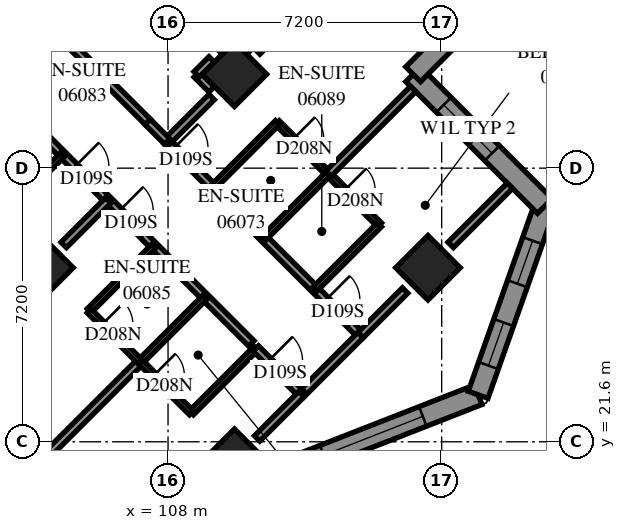
"""IFC4 building model, lengths in metres.
Left out: names, types, materials, properties, quantities, classifications, styles, units other than length and angle.
Written with IfcOpenShell. Run it as: python <this file> out.ifc"""

import sys

from ifc_helpers import new_model, si_unit, direction, frame, frame_2d, origin, origin_2d, place, context, subcontext, project, spatial, polyline, rectangle, outline, extrude, element, fill, save


model = new_model("IFC4")
c1 = context("Model", 3, precision=1e-05, world=origin(), true_north=direction((0.0, 1.0)))
c2 = subcontext(c1, "Body", "Model", "MODEL_VIEW")
j1 = project(units=[si_unit("LENGTHUNIT", "METRE"), si_unit("PLANEANGLEUNIT", "RADIAN")], contexts=[c1])
p1 = place(None, origin())
s1 = spatial("IfcSite", under=j1, at=p1, CompositionType="ELEMENT")
p2 = place(p1, origin())
s2 = spatial("IfcBuilding", under=s1, at=p2, CompositionType="ELEMENT")
p3 = place(p2, frame((0.0, 0.0, 27.0)))
s3 = spatial("IfcBuildingStorey", under=s2, at=p3, CompositionType="ELEMENT", Elevation=27.0)
for number, where, z_axis, x_axis in (
    (1, (109.747, 31.271, 0.0), (0.0, 0.0, 1.0), (0.707, -0.707, 0.0)),
    (2, (104.656, 26.18, 0.0), (0.0, 0.0, 1.0), (0.707, -0.707, 0.0)),
    (3, (114.838, 26.18, 0.0), (0.0, 0.0, 1.0), (0.707, -0.707, 0.0)),
    (4, (109.747, 21.088, 0.0), (0.0, 0.0, 1.0), (0.707, -0.707, 0.0)),
):
    element("IfcColumn", number, at=place(p3, frame(where, z_axis=z_axis, x_axis=x_axis)), inside=s3, PredefinedType="COLUMN", context=c2, shape_type="SweptSolid", body=[
        extrude(rectangle(XDim=1.2, YDim=1.2, at=origin_2d()), origin(), (0.0, 0.0, 1.0), 3.1),
    ])
p4 = place(p3, frame((111.055, 20.841, 0.0), z_axis=(0.0, 0.0, 1.0), x_axis=(0.9313442446, 0.3641399428, 0.0)))
e5 = element("IfcWall", 5, at=p4, inside=s3, PredefinedType="SOLIDWALL", context=c2, shape_type="SweptSolid", body=[
    extrude(outline(polyline([(0.12, -0.275), (5.606, -0.275), (5.354, 0.275), (-0.12, 0.275), (0.12, -0.275)])), origin(), (0.0, 0.0, 1.0), 3.1),
])
p5 = place(p4, frame((1.118, 0.0, 0.5)))
e6 = element("IfcOpeningElement", 6, at=p5, cuts=e5, PredefinedType="OPENING", context=c2, shape_type="SweptSolid", body=[
    extrude(rectangle(XDim=2.8, YDim=2.45, at=frame_2d((1.4, 1.225))), frame((0.0, 0.285, 0.0), z_axis=(0.0, -1.0, 0.0), x_axis=(1.0, 0.0, 0.0)), (0.0, 0.0, 1.0), 0.57),
])
p6 = place(p3, frame((116.159, 22.837, 0.0), z_axis=(0.0, 0.0, 1.0), x_axis=(0.3333124239, 0.9428164339, 0.0)))
e7 = element("IfcWall", 7, at=p6, inside=s3, PredefinedType="SOLIDWALL", context=c2, shape_type="SweptSolid", body=[
    extrude(outline(polyline([(-0.126, -0.275), (5.443, -0.275), (5.096, 0.275), (0.126, 0.275), (-0.126, -0.275)])), origin(), (0.0, 0.0, 1.0), 3.1),
])
p7 = place(p6, frame((0.816, 0.0, 0.5)))
e8 = element("IfcOpeningElement", 8, at=p7, cuts=e7, PredefinedType="OPENING", context=c2, shape_type="SweptSolid", body=[
    extrude(rectangle(XDim=1.2, YDim=2.45, at=frame_2d((0.6, 1.225))), frame((0.0, 0.285, 0.0), z_axis=(0.0, -1.0, 0.0), x_axis=(1.0, 0.0, 0.0)), (0.0, 0.0, 1.0), 0.57),
])
p8 = place(p6, frame((3.101, 0.0, 0.5)))
e9 = element("IfcOpeningElement", 9, at=p8, cuts=e7, PredefinedType="OPENING", context=c2, shape_type="SweptSolid", body=[
    extrude(rectangle(XDim=1.2, YDim=2.45, at=frame_2d((0.6, 1.225))), frame((0.0, 0.285, 0.0), z_axis=(0.0, -1.0, 0.0), x_axis=(1.0, 0.0, 0.0)), (0.0, 0.0, 1.0), 0.57),
])
p9 = place(p3, frame((117.915, 27.805, 0.0), z_axis=(0.0, 0.0, 1.0), x_axis=(-0.7071067812, 0.7071067812, 0.0)))
e10 = element("IfcWall", 10, at=p9, inside=s3, PredefinedType="SOLIDWALL", context=c2, shape_type="SweptSolid", body=[
    extrude(outline(polyline([(-0.173, -0.275), (4.627, -0.275), (5.177, 0.275), (0.173, 0.275), (-0.173, -0.275)])), origin(), (0.0, 0.0, 1.0), 3.1),
])
p10 = place(p9, frame((1.964, 0.0, 0.6)))
e11 = element("IfcOpeningElement", 11, at=p10, cuts=e10, PredefinedType="OPENING", context=c2, shape_type="SweptSolid", body=[
    extrude(rectangle(XDim=1.8, YDim=1.9, at=frame_2d((0.9, 0.95))), frame((0.0, 0.285, 0.0), z_axis=(0.0, -1.0, 0.0), x_axis=(1.0, 0.0, 0.0)), (0.0, 0.0, 1.0), 0.57),
])
p11 = place(p3, frame((114.449, 31.271, 0.0), z_axis=(0.0, 0.0, 1.0), x_axis=(0.7070978821, 0.7071156801, 0.0)))
e12 = element("IfcWall", 12, at=p11, inside=s3, PredefinedType="SOLIDWALL", context=c2, shape_type="SweptSolid", body=[
    extrude(outline(polyline([(0.275, -0.275), (5.975, -0.275), (5.262, 0.275), (-0.275, 0.275), (0.275, -0.275)])), origin(), (0.0, 0.0, 1.0), 3.1),
])
p12 = place(p11, frame((1.137, 0.0, 0.6)))
e13 = element("IfcOpeningElement", 13, at=p12, cuts=e12, PredefinedType="OPENING", context=c2, shape_type="SweptSolid", body=[
    extrude(rectangle(XDim=1.8, YDim=1.9, at=frame_2d((0.9, 0.95))), frame((0.0, 0.285, 0.0), z_axis=(0.0, -1.0, 0.0), x_axis=(1.0, 0.0, 0.0)), (0.0, 0.0, 1.0), 0.57),
])
p13 = place(p3, frame((102.609, 31.769, 0.0), z_axis=(0.0, 0.0, 1.0), x_axis=(0.7071067812, -0.7071067812, 0.0)))
e14 = element("IfcWall", 14, at=p13, inside=s3, PredefinedType="PARTITIONING", context=c2, shape_type="SweptSolid", body=[
    extrude(rectangle(XDim=10.723, YDim=0.2, at=frame_2d((5.361, 0.0))), origin(), (0.0, 0.0, 1.0), 3.1),
])
p14 = place(p13, frame((4.15, 0.0, 0.0)))
e15 = element("IfcOpeningElement", 15, at=p14, cuts=e14, PredefinedType="OPENING", context=c2, shape_type="SweptSolid", body=[
    extrude(rectangle(XDim=0.9, YDim=2.1, at=frame_2d((0.45, 1.05))), frame((0.0, 0.11, 0.0), z_axis=(0.0, -1.0, 0.0), x_axis=(1.0, 0.0, 0.0)), (0.0, 0.0, 1.0), 0.22),
])
p15 = place(p13, frame((5.8, 0.0, 0.0)))
e16 = element("IfcOpeningElement", 16, at=p15, cuts=e14, PredefinedType="OPENING", context=c2, shape_type="SweptSolid", body=[
    extrude(rectangle(XDim=0.9, YDim=2.1, at=frame_2d((0.45, 1.05))), frame((0.0, 0.11, 0.0), z_axis=(0.0, -1.0, 0.0), x_axis=(1.0, 0.0, 0.0)), (0.0, 0.0, 1.0), 0.22),
])
p16 = place(p3, frame((101.597, 18.038, 0.0), z_axis=(0.0, 0.0, 1.0), x_axis=(0.7072439346, 0.7069696012, 0.0)))
e17 = element("IfcWall", 17, at=p16, inside=s3, PredefinedType="PARTITIONING", context=c2, shape_type="SweptSolid", body=[
    extrude(rectangle(XDim=8.019, YDim=0.2, at=frame_2d((4.01, 0.0))), origin(), (0.0, 0.0, 1.0), 3.1),
])
p17 = place(p3, frame((107.977, 29.499, 0.0), z_axis=(0.0, 0.0, 1.0), x_axis=(0.7071067812, -0.7071067812, 0.0)))
e18 = element("IfcWall", 18, at=p17, inside=s3, PredefinedType="PARTITIONING", context=c2, shape_type="SweptSolid", body=[
    extrude(rectangle(XDim=7.198, YDim=0.2, at=frame_2d((3.599, 0.0))), origin(), (0.0, 0.0, 1.0), 3.1),
])
p18 = place(p17, frame((0.247, 0.0, 0.0)))
e19 = element("IfcOpeningElement", 19, at=p18, cuts=e18, PredefinedType="OPENING", context=c2, shape_type="SweptSolid", body=[
    extrude(rectangle(XDim=0.9, YDim=2.1, at=frame_2d((0.45, 1.05))), frame((0.0, 0.11, 0.0), z_axis=(0.0, -1.0, 0.0), x_axis=(1.0, 0.0, 0.0)), (0.0, 0.0, 1.0), 0.22),
])
p19 = place(p17, frame((5.899, 0.0, 0.0)))
e20 = element("IfcOpeningElement", 20, at=p19, cuts=e18, PredefinedType="OPENING", context=c2, shape_type="SweptSolid", body=[
    extrude(rectangle(XDim=0.9, YDim=2.1, at=frame_2d((0.45, 1.05))), frame((0.0, 0.11, 0.0), z_axis=(0.0, -1.0, 0.0), x_axis=(1.0, 0.0, 0.0)), (0.0, 0.0, 1.0), 0.22),
])
p20 = place(p3, frame((110.345, 31.871, 0.0), z_axis=(0.0, 0.0, 1.0), x_axis=(0.7071067812, 0.7071067812, 0.0)))
e21 = element("IfcWall", 21, at=p20, inside=s3, PredefinedType="PARTITIONING", context=c2, shape_type="SweptSolid", body=[
    extrude(rectangle(XDim=5.504, YDim=0.2, at=frame_2d((2.752, 0.0))), origin(), (0.0, 0.0, 1.0), 3.1),
])
p21 = place(p3, frame((110.875, 29.995, 0.0), z_axis=(0.0, 0.0, 1.0), x_axis=(0.7071067812, -0.7071067812, 0.0)))
e22 = element("IfcWall", 22, at=p21, inside=s3, PredefinedType="PARTITIONING", context=c2, shape_type="SweptSolid", body=[
    extrude(rectangle(XDim=3.801, YDim=0.15, at=frame_2d((1.901, 0.0))), origin(), (0.0, 0.0, 1.0), 3.1),
])
p22 = place(p21, frame((0.598, 0.0, 0.0)))
e23 = element("IfcOpeningElement", 23, at=p22, cuts=e22, PredefinedType="OPENING", context=c2, shape_type="SweptSolid", body=[
    extrude(rectangle(XDim=0.8, YDim=2.1, at=frame_2d((0.4, 1.05))), frame((0.0, 0.085, 0.0), z_axis=(0.0, -1.0, 0.0), x_axis=(1.0, 0.0, 0.0)), (0.0, 0.0, 1.0), 0.17),
])
p23 = place(p21, frame((2.507, 0.0, 0.0)))
e24 = element("IfcOpeningElement", 24, at=p23, cuts=e22, PredefinedType="OPENING", context=c2, shape_type="SweptSolid", body=[
    extrude(rectangle(XDim=0.8, YDim=2.1, at=frame_2d((0.4, 1.05))), frame((0.0, 0.085, 0.0), z_axis=(0.0, -1.0, 0.0), x_axis=(1.0, 0.0, 0.0)), (0.0, 0.0, 1.0), 0.17),
])
p24 = place(p3, frame((112.221, 28.655, 0.0), z_axis=(0.0, 0.0, 1.0), x_axis=(0.7071067812, 0.7071067812, 0.0)))
e25 = element("IfcWall", 25, at=p24, inside=s3, PredefinedType="PARTITIONING", context=c2, shape_type="SweptSolid", body=[
    extrude(rectangle(XDim=3.15, YDim=0.2, at=frame_2d((1.575, 0.0))), origin(), (0.0, 0.0, 1.0), 3.1),
])
p25 = place(p3, frame((105.435, 32.049, 0.0), z_axis=(0.0, 0.0, 1.0), x_axis=(0.7074545101, -0.7067588812, 0.0)))
e26 = element("IfcWall", 26, at=p25, inside=s3, PredefinedType="PARTITIONING", context=c2, shape_type="SweptSolid", body=[
    extrude(rectangle(XDim=2.875, YDim=0.2, at=frame_2d((1.438, 0.0))), origin(), (0.0, 0.0, 1.0), 3.1),
])
for number, where, z_axis, x_axis in (
    (27, (103.523, 27.453, 0.0), (0.0, 0.0, 1.0), (0.707, 0.707, 0.0)),
    (28, (105.927, 25.049, 0.0), (0.0, 0.0, 1.0), (0.707, 0.707, 0.0)),
    (29, (107.271, 23.705, 0.0), (0.0, 0.0, 1.0), (0.707, 0.707, 0.0)),
):
    element("IfcWall", number, at=place(p3, frame(where, z_axis=z_axis, x_axis=x_axis)), inside=s3, PredefinedType="PARTITIONING", context=c2, shape_type="SweptSolid", body=[
        extrude(rectangle(XDim=2.401, YDim=0.15, at=frame_2d((1.201, 0.0))), origin(), (0.0, 0.0, 1.0), 3.1),
    ])
for number, where, z_axis, x_axis in (
    (30, (109.182, 28.3, 0.0), (0.0, 0.0, 1.0), (0.707, 0.708, 0.0)),
    (31, (111.865, 25.616, 0.0), (0.0, 0.0, 1.0), (0.708, 0.707, 0.0)),
    (32, (110.522, 26.96, 0.0), (0.0, 0.0, 1.0), (0.708, 0.707, 0.0)),
):
    element("IfcWall", number, at=place(p3, frame(where, z_axis=z_axis, x_axis=x_axis)), inside=s3, PredefinedType="PARTITIONING", context=c2, shape_type="SweptSolid", body=[
        extrude(rectangle(XDim=2.4, YDim=0.15, at=frame_2d((1.2, 0.0))), origin(), (0.0, 0.0, 1.0), 3.1),
    ])
p26 = place(p3, frame((108.615, 22.363, 0.0), z_axis=(0.0, 0.0, 1.0), x_axis=(0.7071067812, 0.7071067812, 0.0)))
e33 = element("IfcWall", 33, at=p26, inside=s3, PredefinedType="PARTITIONING", context=c2, shape_type="SweptSolid", body=[
    extrude(rectangle(XDim=2.398, YDim=0.15, at=frame_2d((1.199, 0.0))), origin(), (0.0, 0.0, 1.0), 3.1),
])
p27 = place(p3, frame((111.513, 22.857, 0.0), z_axis=(0.0, 0.0, 1.0), x_axis=(0.7071067812, 0.7071067812, 0.0)))
e34 = element("IfcWall", 34, at=p27, inside=s3, PredefinedType="PARTITIONING", context=c2, shape_type="SweptSolid", body=[
    extrude(rectangle(XDim=2.2, YDim=0.2, at=frame_2d((1.1, 0.0))), origin(), (0.0, 0.0, 1.0), 2.6),
])
p28 = place(p3, frame((115.438, 26.78, 0.0), z_axis=(0.0, 0.0, 1.0), x_axis=(0.7071067812, 0.7071067812, 0.0)))
e35 = element("IfcWall", 35, at=p28, inside=s3, PredefinedType="PARTITIONING", context=c2, shape_type="SweptSolid", body=[
    extrude(rectangle(XDim=2.201, YDim=0.2, at=frame_2d((1.101, 0.0))), origin(), (0.0, 0.0, 1.0), 3.1),
])
p29 = place(p3, frame((105.925, 25.045, 0.0), z_axis=(0.0, 0.0, 1.0), x_axis=(0.7071067812, -0.7071067812, 0.0)))
e36 = element("IfcWall", 36, at=p29, inside=s3, PredefinedType="PARTITIONING", context=c2, shape_type="SweptSolid", body=[
    extrude(rectangle(XDim=1.901, YDim=0.15, at=frame_2d((0.95, 0.0))), origin(), (0.0, 0.0, 1.0), 3.1),
])
p30 = place(p29, frame((0.493, 0.0, 0.0)))
e37 = element("IfcOpeningElement", 37, at=p30, cuts=e36, PredefinedType="OPENING", context=c2, shape_type="SweptSolid", body=[
    extrude(rectangle(XDim=0.8, YDim=2.1, at=frame_2d((0.4, 1.05))), frame((0.0, 0.085, 0.0), z_axis=(0.0, -1.0, 0.0), x_axis=(1.0, 0.0, 0.0)), (0.0, 0.0, 1.0), 0.17),
])
p31 = place(p3, frame((107.272, 23.704, 0.0), z_axis=(0.0, 0.0, 1.0), x_axis=(0.7076330979, -0.7065800724, 0.0)))
e38 = element("IfcWall", 38, at=p31, inside=s3, PredefinedType="PARTITIONING", context=c2, shape_type="SweptSolid", body=[
    extrude(rectangle(XDim=1.899, YDim=0.15, at=frame_2d((0.95, 0.0))), origin(), (0.0, 0.0, 1.0), 3.1),
])
p32 = place(p31, frame((0.503, 0.0, 0.0)))
e39 = element("IfcOpeningElement", 39, at=p32, cuts=e38, PredefinedType="OPENING", context=c2, shape_type="SweptSolid", body=[
    extrude(rectangle(XDim=0.8, YDim=2.1, at=frame_2d((0.4, 1.05))), frame((0.0, 0.085, 0.0), z_axis=(0.0, -1.0, 0.0), x_axis=(1.0, 0.0, 0.0)), (0.0, 0.0, 1.0), 0.17),
])
p33 = place(p3, frame((110.309, 24.055, 0.0), z_axis=(0.0, 0.0, 1.0), x_axis=(0.7071067812, -0.7071067812, 0.0)))
e40 = element("IfcWall", 40, at=p33, inside=s3, PredefinedType="PARTITIONING", context=c2, shape_type="SweptSolid", body=[
    extrude(rectangle(XDim=1.7, YDim=0.2, at=frame_2d((0.85, 0.0))), origin(), (0.0, 0.0, 1.0), 3.1),
])
p34 = place(p33, frame((0.467, 0.0, 0.0)))
e41 = element("IfcOpeningElement", 41, at=p34, cuts=e40, PredefinedType="OPENING", context=c2, shape_type="SweptSolid", body=[
    extrude(rectangle(XDim=0.9, YDim=2.1, at=frame_2d((0.45, 1.05))), frame((0.0, 0.11, 0.0), z_axis=(0.0, -1.0, 0.0), x_axis=(1.0, 0.0, 0.0)), (0.0, 0.0, 1.0), 0.22),
])
p35 = place(p3, frame((105.255, 26.781, 0.0), z_axis=(0.0, 0.0, 1.0), x_axis=(0.7071067812, 0.7071067812, 0.0)))
e42 = element("IfcWall", 42, at=p35, inside=s3, PredefinedType="PARTITIONING", context=c2, shape_type="SweptSolid", body=[
    extrude(rectangle(XDim=1.652, YDim=0.2, at=frame_2d((0.826, 0.0))), origin(), (0.0, 0.0, 1.0), 3.1),
])
for number, where, z_axis, x_axis in (
    (43, (110.346, 21.689, 0.0), (0.0, 0.0, 1.0), (0.707, 0.707, 0.0)),
    (44, (113.07, 24.413, 0.0), (0.0, 0.0, 1.0), (0.707, 0.707, 0.0)),
):
    element("IfcWall", number, at=place(p3, frame(where, z_axis=z_axis, x_axis=x_axis)), inside=s3, PredefinedType="PARTITIONING", context=c2, shape_type="SweptSolid", body=[
        extrude(rectangle(XDim=1.652, YDim=0.2, at=frame_2d((0.826, 0.0))), origin(), (0.0, 0.0, 1.0), 2.6),
    ])
p36 = place(p3, frame((107.978, 29.504, 0.0), z_axis=(0.0, 0.0, 1.0), x_axis=(0.7071067812, 0.7071067812, 0.0)))
e45 = element("IfcWall", 45, at=p36, inside=s3, PredefinedType="PARTITIONING", context=c2, shape_type="SweptSolid", body=[
    extrude(rectangle(XDim=1.652, YDim=0.2, at=frame_2d((0.826, 0.0))), origin(), (0.0, 0.0, 1.0), 3.1),
])
p37 = place(p3, frame((107.466, 30.014, 0.0), z_axis=(0.0, 0.0, 1.0), x_axis=(0.7057270646, -0.7084838109, 0.0)))
e46 = element("IfcWall", 46, at=p37, inside=s3, PredefinedType="PARTITIONING", context=c2, shape_type="SweptSolid", body=[
    extrude(rectangle(XDim=0.726, YDim=0.2, at=frame_2d((0.363, 0.0))), origin(), (0.0, 0.0, 1.0), 3.1),
])
for number, where, z_axis, x_axis in (
    (47, (108.754, 31.268, 0.0), (0.0, 0.0, 1.0), (0.707, -0.707, 0.0)),
    (48, (109.751, 32.265, 0.0), (0.0, 0.0, 1.0), (0.707, -0.707, 0.0)),
    (49, (109.355, 31.871, 0.0), (0.0, 0.0, 1.0), (0.707, 0.707, 0.0)),
    (50, (108.753, 31.269, 0.0), (0.0, 0.0, 1.0), (0.707, 0.707, 0.0)),
):
    element("IfcWall", number, at=place(p3, frame(where, z_axis=z_axis, x_axis=x_axis)), inside=s3, PredefinedType="PARTITIONING", context=c2, shape_type="SweptSolid", body=[
        extrude(rectangle(XDim=0.557, YDim=0.2, at=frame_2d((0.279, 0.0))), origin(), (0.0, 0.0, 1.0), 3.1),
    ])
p38 = place(p5, origin())
e51 = element("IfcWindow", 51, at=p38, inside=s3, PartitioningType="SINGLE_PANEL", PredefinedType="WINDOW", context=c2, shape_type="SweptSolid", body=[
    extrude(rectangle(XDim=2.8, YDim=2.45, at=frame_2d((1.4, 1.225))), frame((0.0, 0.155, 0.0), z_axis=(0.0, -1.0, 0.0), x_axis=(1.0, 0.0, 0.0)), (0.0, 0.0, 1.0), 0.06),
])
fill(e6, e51)
p39 = place(p7, origin())
e52 = element("IfcWindow", 52, at=p39, inside=s3, PartitioningType="SINGLE_PANEL", PredefinedType="WINDOW", context=c2, shape_type="SweptSolid", body=[
    extrude(rectangle(XDim=1.2, YDim=2.45, at=frame_2d((0.6, 1.225))), frame((0.0, 0.155, 0.0), z_axis=(0.0, -1.0, 0.0), x_axis=(1.0, 0.0, 0.0)), (0.0, 0.0, 1.0), 0.06),
])
fill(e8, e52)
p40 = place(p8, origin())
e53 = element("IfcWindow", 53, at=p40, inside=s3, PartitioningType="SINGLE_PANEL", PredefinedType="WINDOW", context=c2, shape_type="SweptSolid", body=[
    extrude(rectangle(XDim=1.2, YDim=2.45, at=frame_2d((0.6, 1.225))), frame((0.0, 0.155, 0.0), z_axis=(0.0, -1.0, 0.0), x_axis=(1.0, 0.0, 0.0)), (0.0, 0.0, 1.0), 0.06),
])
fill(e9, e53)
p41 = place(p10, origin())
e54 = element("IfcWindow", 54, at=p41, inside=s3, PartitioningType="SINGLE_PANEL", PredefinedType="WINDOW", context=c2, shape_type="SweptSolid", body=[
    extrude(rectangle(XDim=1.8, YDim=1.9, at=frame_2d((0.9, 0.95))), frame((0.0, 0.155, 0.0), z_axis=(0.0, -1.0, 0.0), x_axis=(1.0, 0.0, 0.0)), (0.0, 0.0, 1.0), 0.06),
])
fill(e11, e54)
p42 = place(p18, origin())
e55 = element("IfcDoor", 55, at=p42, inside=s3, OperationType="SINGLE_SWING_LEFT", PredefinedType="DOOR", context=c2, shape_type="SweptSolid", body=[
    extrude(rectangle(XDim=0.9, YDim=2.1, at=frame_2d((0.45, 1.05))), frame((0.0, 0.025, 0.0), z_axis=(0.0, -1.0, 0.0), x_axis=(1.0, 0.0, 0.0)), (0.0, 0.0, 1.0), 0.05),
])
fill(e19, e55)
p43 = place(p22, origin())
e56 = element("IfcDoor", 56, at=p43, inside=s3, OperationType="SINGLE_SWING_RIGHT", PredefinedType="DOOR", context=c2, shape_type="SweptSolid", body=[
    extrude(rectangle(XDim=0.8, YDim=2.1, at=frame_2d((0.4, 1.05))), frame((0.0, 0.025, 0.0), z_axis=(0.0, -1.0, 0.0), x_axis=(1.0, 0.0, 0.0)), (0.0, 0.0, 1.0), 0.05),
])
fill(e23, e56)
p44 = place(p14, origin())
e57 = element("IfcDoor", 57, at=p44, inside=s3, OperationType="SINGLE_SWING_LEFT", PredefinedType="DOOR", context=c2, shape_type="SweptSolid", body=[
    extrude(rectangle(XDim=0.9, YDim=2.1, at=frame_2d((0.45, 1.05))), frame((0.0, 0.025, 0.0), z_axis=(0.0, -1.0, 0.0), x_axis=(1.0, 0.0, 0.0)), (0.0, 0.0, 1.0), 0.05),
])
fill(e15, e57)
p45 = place(p15, origin())
e58 = element("IfcDoor", 58, at=p45, inside=s3, OperationType="SINGLE_SWING_RIGHT", PredefinedType="DOOR", context=c2, shape_type="SweptSolid", body=[
    extrude(rectangle(XDim=0.9, YDim=2.1, at=frame_2d((0.45, 1.05))), frame((0.0, 0.025, 0.0), z_axis=(0.0, -1.0, 0.0), x_axis=(1.0, 0.0, 0.0)), (0.0, 0.0, 1.0), 0.05),
])
fill(e16, e58)
p46 = place(p30, origin())
e59 = element("IfcDoor", 59, at=p46, inside=s3, OperationType="SINGLE_SWING_RIGHT", PredefinedType="DOOR", context=c2, shape_type="SweptSolid", body=[
    extrude(rectangle(XDim=0.8, YDim=2.1, at=frame_2d((0.4, 1.05))), frame((0.0, 0.025, 0.0), z_axis=(0.0, -1.0, 0.0), x_axis=(1.0, 0.0, 0.0)), (0.0, 0.0, 1.0), 0.05),
])
fill(e37, e59)
p47 = place(p34, origin())
e60 = element("IfcDoor", 60, at=p47, inside=s3, OperationType="SINGLE_SWING_LEFT", PredefinedType="DOOR", context=c2, shape_type="SweptSolid", body=[
    extrude(rectangle(XDim=0.9, YDim=2.1, at=frame_2d((0.45, 1.05))), frame((0.0, 0.025, 0.0), z_axis=(0.0, -1.0, 0.0), x_axis=(1.0, 0.0, 0.0)), (0.0, 0.0, 1.0), 0.05),
])
fill(e41, e60)
p48 = place(p32, origin())
e61 = element("IfcDoor", 61, at=p48, inside=s3, OperationType="SINGLE_SWING_RIGHT", PredefinedType="DOOR", context=c2, shape_type="SweptSolid", body=[
    extrude(rectangle(XDim=0.8, YDim=2.1, at=frame_2d((0.4, 1.05))), frame((0.0, 0.025, 0.0), z_axis=(0.0, -1.0, 0.0), x_axis=(1.0, 0.0, 0.0)), (0.0, 0.0, 1.0), 0.05),
])
fill(e39, e61)
p49 = place(p19, origin())
e62 = element("IfcDoor", 62, at=p49, inside=s3, OperationType="SINGLE_SWING_RIGHT", PredefinedType="DOOR", context=c2, shape_type="SweptSolid", body=[
    extrude(rectangle(XDim=0.9, YDim=2.1, at=frame_2d((0.45, 1.05))), frame((0.0, 0.025, 0.0), z_axis=(0.0, -1.0, 0.0), x_axis=(1.0, 0.0, 0.0)), (0.0, 0.0, 1.0), 0.05),
])
fill(e20, e62)
p50 = place(p23, origin())
e63 = element("IfcDoor", 63, at=p50, inside=s3, OperationType="SINGLE_SWING_RIGHT", PredefinedType="DOOR", context=c2, shape_type="SweptSolid", body=[
    extrude(rectangle(XDim=0.8, YDim=2.1, at=frame_2d((0.4, 1.05))), frame((0.0, 0.025, 0.0), z_axis=(0.0, -1.0, 0.0), x_axis=(1.0, 0.0, 0.0)), (0.0, 0.0, 1.0), 0.05),
])
fill(e24, e63)
save(model, sys.argv[1])
